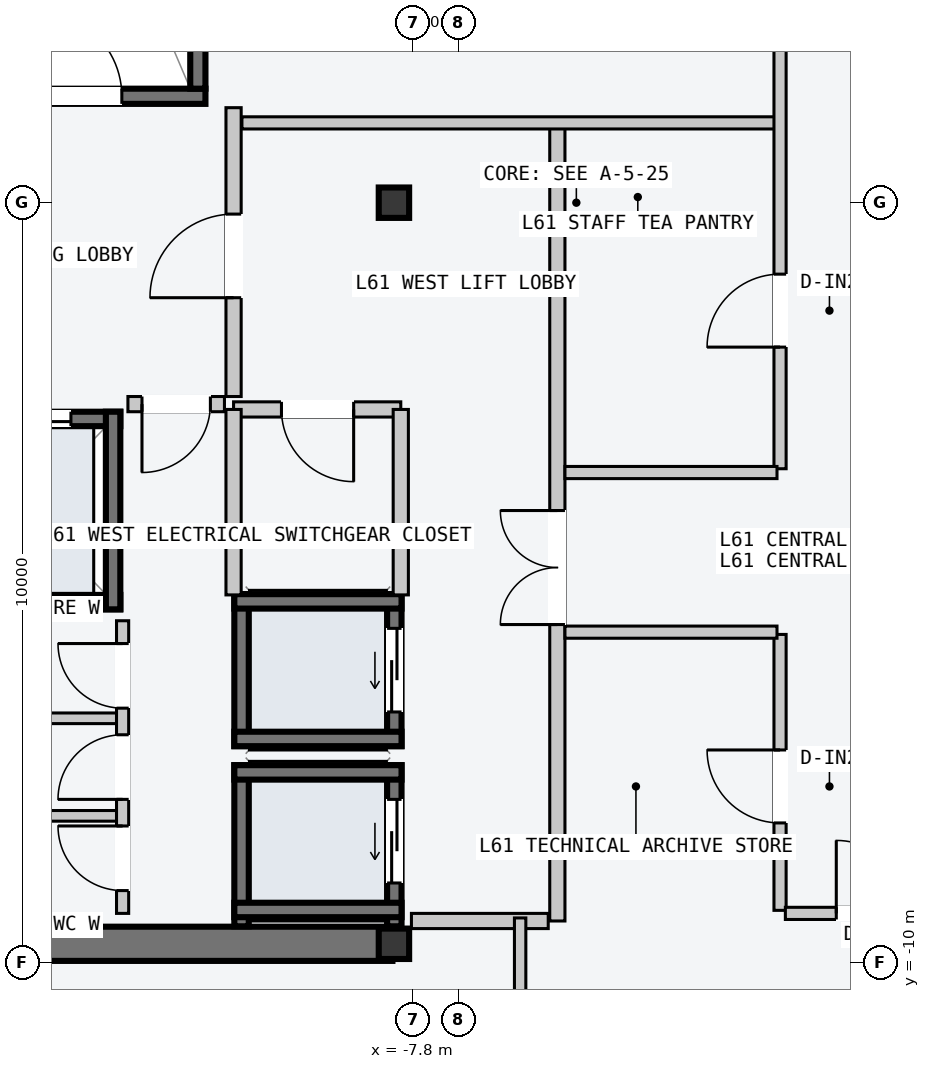
"""IFC4 building model, lengths in metres.
Left out: names, types, materials, properties, quantities, classifications, styles, units other than length and angle.
Written with IfcOpenShell. Run it as: python <this file> out.ifc"""

import sys

from ifc_helpers import new_model, si_unit, direction, frame, frame_2d, origin, origin_2d, place, context, subcontext, project, spatial, rectangle, i_section, extrude, element, fill, save


model = new_model("IFC4")
c1 = context("Model", 3, precision=1e-05, world=origin(), true_north=direction((0.0, 1.0)))
c2 = subcontext(c1, "Body", "Model", "MODEL_VIEW")
j1 = project(units=[si_unit("LENGTHUNIT", "METRE"), si_unit("PLANEANGLEUNIT", "RADIAN")], contexts=[c1])
p1 = place(None, origin())
s1 = spatial("IfcSite", under=j1, at=p1, CompositionType="ELEMENT")
p2 = place(p1, origin())
s2 = spatial("IfcBuilding", under=s1, at=p2, CompositionType="ELEMENT")
p3 = place(p2, frame((0.0, 0.0, 232.8)))
s3 = spatial("IfcBuildingStorey", under=s2, at=p3, CompositionType="ELEMENT", Elevation=232.8)
p4 = place(p3, frame((-14.53, -9.75, -0.2), z_axis=(0.0, 0.0, 1.0), x_axis=(1.0, 0.0, 0.0)))
e1 = element("IfcWall", 1, at=p4, inside=s3, PredefinedType="SHEAR", context=c2, shape_type="SweptSolid", body=[
    extrude(rectangle(XDim=6.46, YDim=0.45, at=frame_2d((3.23, 0.0))), origin(), (0.0, 0.0, 1.0), 3.6),
])
p5 = place(p3, frame((-14.25, 1.4, -0.2), z_axis=(0.0, 0.0, 1.0), x_axis=(1.0, 0.0, 0.0)))
e2 = element("IfcWall", 2, at=p5, inside=s3, PredefinedType="SOLIDWALL", context=c2, shape_type="SweptSolid", body=[
    extrude(rectangle(XDim=3.72, YDim=0.2, at=frame_2d((1.86, 0.0))), origin(), (0.0, 0.0, 1.0), 3.6),
])
p6 = place(p5, frame((1.5, 0.0, 0.2)))
e3 = element("IfcOpeningElement", 3, at=p6, cuts=e2, PredefinedType="OPENING", context=c2, shape_type="SweptSolid", body=[
    extrude(rectangle(XDim=1.12, YDim=2.18, at=frame_2d((0.56, 1.09))), frame((0.0, 0.11, 0.0), z_axis=(0.0, -1.0, 0.0), x_axis=(1.0, 0.0, 0.0)), (0.0, 0.0, 1.0), 0.22),
])
p7 = place(p3, frame((-10.63, 1.5, -0.2), z_axis=(0.0, 0.0, 1.0), x_axis=(0.0, 1.0, 0.0)))
e4 = element("IfcWall", 4, at=p7, inside=s3, PredefinedType="SOLIDWALL", context=c2, shape_type="SweptSolid", body=[
    extrude(rectangle(XDim=7.8, YDim=0.2, at=frame_2d((3.9, 0.0))), origin(), (0.0, 0.0, 1.0), 3.6),
])
for number, where, z_axis, x_axis in (
    (5, (-8.05, -9.75, 0.0), (0.0, 0.0, 1.0), (1.0, 0.0, 0.0)),
    (6, (-8.05, 0.0, 0.0), (0.0, 0.0, 1.0), (1.0, 0.0, 0.0)),
):
    element("IfcColumn", number, at=place(p3, frame(where, z_axis=z_axis, x_axis=x_axis)), inside=s3, PredefinedType="COLUMN", context=c2, shape_type="SweptSolid", body=[
        extrude(i_section(OverallWidth=0.4, OverallDepth=0.4, WebThickness=0.013, FlangeThickness=0.021, at=origin_2d()), origin(), (0.0, 0.0, 1.0), 3.6),
    ])
p8 = place(p3, frame((-8.045, -9.52, -0.2), z_axis=(0.0, 0.0, 1.0), x_axis=(0.0, 1.0, 0.0)))
e7 = element("IfcWall", 7, at=p8, inside=s3, PredefinedType="SOLIDWALL", context=c2, shape_type="SweptSolid", body=[
    extrude(rectangle(XDim=2.12, YDim=0.19, at=frame_2d((1.06, 0.0))), origin(), (0.0, 0.0, 1.0), 3.6),
])
p9 = place(p8, frame((0.57, 0.0, 0.2)))
e8 = element("IfcOpeningElement", 8, at=p9, cuts=e7, PredefinedType="OPENING", context=c2, shape_type="SweptSolid", body=[
    extrude(rectangle(XDim=1.1, YDim=2.2, at=frame_2d((0.55, 1.1))), frame((0.0, 0.105, 0.0), z_axis=(0.0, -1.0, 0.0), x_axis=(1.0, 0.0, 0.0)), (0.0, 0.0, 1.0), 0.21),
])
p10 = place(p3, frame((-10.055, -9.52, -0.2), z_axis=(0.0, 0.0, 1.0), x_axis=(0.0, 1.0, 0.0)))
e9 = element("IfcWall", 9, at=p10, inside=s3, PredefinedType="SOLIDWALL", context=c2, shape_type="SweptSolid", body=[
    extrude(rectangle(XDim=2.12, YDim=0.19, at=frame_2d((1.06, 0.0))), origin(), (0.0, 0.0, 1.0), 3.6),
])
for number, where, z_axis, x_axis in (
    (10, (-10.15, -7.495, -0.2), (0.0, 0.0, 1.0), (1.0, 0.0, 0.0)),
    (11, (-10.15, -9.305, -0.2), (0.0, 0.0, 1.0), (1.0, 0.0, 0.0)),
):
    element("IfcWall", number, at=place(p3, frame(where, z_axis=z_axis, x_axis=x_axis)), inside=s3, PredefinedType="SOLIDWALL", context=c2, shape_type="SweptSolid", body=[
        extrude(rectangle(XDim=2.2, YDim=0.19, at=frame_2d((1.1, 0.0))), origin(), (0.0, 0.0, 1.0), 3.6),
    ])
p11 = place(p3, frame((-8.045, -7.15, -0.2), z_axis=(0.0, 0.0, 1.0), x_axis=(0.0, 1.0, 0.0)))
e12 = element("IfcWall", 12, at=p11, inside=s3, PredefinedType="SOLIDWALL", context=c2, shape_type="SweptSolid", body=[
    extrude(rectangle(XDim=2.0, YDim=0.19, at=frame_2d((1.0, 0.0))), origin(), (0.0, 0.0, 1.0), 3.6),
])
p12 = place(p11, frame((0.45, 0.0, 0.2)))
e13 = element("IfcOpeningElement", 13, at=p12, cuts=e12, PredefinedType="OPENING", context=c2, shape_type="SweptSolid", body=[
    extrude(rectangle(XDim=1.1, YDim=2.2, at=frame_2d((0.55, 1.1))), frame((0.0, 0.105, 0.0), z_axis=(0.0, -1.0, 0.0), x_axis=(1.0, 0.0, 0.0)), (0.0, 0.0, 1.0), 0.21),
])
p13 = place(p3, frame((-10.055, -7.15, -0.2), z_axis=(0.0, 0.0, 1.0), x_axis=(0.0, 1.0, 0.0)))
e14 = element("IfcWall", 14, at=p13, inside=s3, PredefinedType="SOLIDWALL", context=c2, shape_type="SweptSolid", body=[
    extrude(rectangle(XDim=2.0, YDim=0.19, at=frame_2d((1.0, 0.0))), origin(), (0.0, 0.0, 1.0), 3.6),
])
for number, where, z_axis, x_axis in (
    (15, (-10.15, -5.245, -0.2), (0.0, 0.0, 1.0), (1.0, 0.0, 0.0)),
    (16, (-10.15, -7.055, -0.2), (0.0, 0.0, 1.0), (1.0, 0.0, 0.0)),
):
    element("IfcWall", number, at=place(p3, frame(where, z_axis=z_axis, x_axis=x_axis)), inside=s3, PredefinedType="SOLIDWALL", context=c2, shape_type="SweptSolid", body=[
        extrude(rectangle(XDim=2.2, YDim=0.19, at=frame_2d((1.1, 0.0))), origin(), (0.0, 0.0, 1.0), 3.6),
    ])
p14 = place(p3, frame((-14.33, -2.845, -0.2), z_axis=(0.0, 0.0, 1.0), x_axis=(1.0, 0.0, 0.0)))
e17 = element("IfcWall", 17, at=p14, inside=s3, PredefinedType="SOLIDWALL", context=c2, shape_type="SweptSolid", body=[
    extrude(rectangle(XDim=2.68, YDim=0.19, at=frame_2d((1.34, 0.0))), origin(), (0.0, 0.0, 1.0), 3.6),
])
p15 = place(p14, frame((0.83, 0.0, 0.2)))
e18 = element("IfcOpeningElement", 18, at=p15, cuts=e17, PredefinedType="OPENING", context=c2, shape_type="SweptSolid", body=[
    extrude(rectangle(XDim=1.2, YDim=2.2, at=frame_2d((0.6, 1.1))), frame((0.0, 0.105, 0.0), z_axis=(0.0, -1.0, 0.0), x_axis=(1.0, 0.0, 0.0)), (0.0, 0.0, 1.0), 0.21),
])
p16 = place(p3, frame((-14.33, -5.255, -0.2), z_axis=(0.0, 0.0, 1.0), x_axis=(1.0, 0.0, 0.0)))
e19 = element("IfcWall", 19, at=p16, inside=s3, PredefinedType="SOLIDWALL", context=c2, shape_type="SweptSolid", body=[
    extrude(rectangle(XDim=2.68, YDim=0.19, at=frame_2d((1.34, 0.0))), origin(), (0.0, 0.0, 1.0), 3.6),
])
p17 = place(p3, frame((-11.745, -5.35, -0.2), z_axis=(0.0, 0.0, 1.0), x_axis=(0.0, 1.0, 0.0)))
e20 = element("IfcWall", 20, at=p17, inside=s3, PredefinedType="SOLIDWALL", context=c2, shape_type="SweptSolid", body=[
    extrude(rectangle(XDim=2.6, YDim=0.19, at=frame_2d((1.3, 0.0))), origin(), (0.0, 0.0, 1.0), 3.6),
])
p18 = place(p3, frame((-5.9, -9.45, 0.0), z_axis=(0.0, 0.0, 1.0), x_axis=(0.0, 1.0, 0.0)))
e21 = element("IfcWall", 21, at=p18, inside=s3, PredefinedType="PARTITIONING", context=c2, shape_type="SweptSolid", body=[
    extrude(rectangle(XDim=10.5, YDim=0.2, at=frame_2d((5.25, 0.0))), origin(), (0.0, 0.0, 1.0), 3.4),
])
p19 = place(p18, frame((3.9, 0.0, 0.0)))
e22 = element("IfcOpeningElement", 22, at=p19, cuts=e21, PredefinedType="OPENING", context=c2, shape_type="SweptSolid", body=[
    extrude(rectangle(XDim=1.5, YDim=2.2, at=frame_2d((0.75, 1.1))), frame((0.0, 0.11, 0.0), z_axis=(0.0, -1.0, 0.0), x_axis=(1.0, 0.0, 0.0)), (0.0, 0.0, 1.0), 0.22),
])
p20 = place(p3, frame((-6.02, -9.45, 0.0), z_axis=(0.0, 0.0, 1.0), x_axis=(-1.0, 0.0, 0.0)))
e23 = element("IfcWall", 23, at=p20, inside=s3, PredefinedType="PARTITIONING", context=c2, shape_type="SweptSolid", body=[
    extrude(rectangle(XDim=1.8, YDim=0.2, at=frame_2d((0.9, 0.0))), origin(), (0.0, 0.0, 1.0), 3.4),
])
p21 = place(p3, frame((-10.16, -2.55, 0.0), z_axis=(0.0, 0.0, 1.0), x_axis=(0.0, 1.0, 0.0)))
e24 = element("IfcWall", 24, at=p21, inside=s3, PredefinedType="PARTITIONING", context=c2, shape_type="SweptSolid", body=[
    extrude(rectangle(XDim=3.8, YDim=0.2, at=frame_2d((1.9, 0.0))), origin(), (0.0, 0.0, 1.0), 3.4),
])
p22 = place(p21, frame((1.3, 0.0, 0.0)))
e25 = element("IfcOpeningElement", 25, at=p22, cuts=e24, PredefinedType="OPENING", context=c2, shape_type="SweptSolid", body=[
    extrude(rectangle(XDim=1.1, YDim=2.15, at=frame_2d((0.55, 1.075))), frame((0.0, 0.11, 0.0), z_axis=(0.0, -1.0, 0.0), x_axis=(1.0, 0.0, 0.0)), (0.0, 0.0, 1.0), 0.22),
])
p23 = place(p3, frame((-10.28, -2.65, 0.0), z_axis=(0.0, 0.0, 1.0), x_axis=(-1.0, 0.0, 0.0)))
e26 = element("IfcWall", 26, at=p23, inside=s3, PredefinedType="PARTITIONING", context=c2, shape_type="SweptSolid", body=[
    extrude(rectangle(XDim=1.27, YDim=0.2, at=frame_2d((0.635, 0.0))), origin(), (0.0, 0.0, 1.0), 3.4),
])
p24 = place(p23, frame((0.185, 0.0, 0.0)))
e27 = element("IfcOpeningElement", 27, at=p24, cuts=e26, PredefinedType="OPENING", context=c2, shape_type="SweptSolid", body=[
    extrude(rectangle(XDim=0.9, YDim=2.15, at=frame_2d((0.45, 1.075))), frame((0.0, 0.11, 0.0), z_axis=(0.0, -1.0, 0.0), x_axis=(1.0, 0.0, 0.0)), (0.0, 0.0, 1.0), 0.22),
])
p25 = place(p3, frame((-7.96, -2.72, 0.0), z_axis=(0.0, 0.0, 1.0), x_axis=(-1.0, 0.0, 0.0)))
e28 = element("IfcWall", 28, at=p25, inside=s3, PredefinedType="PARTITIONING", context=c2, shape_type="SweptSolid", body=[
    extrude(rectangle(XDim=2.2, YDim=0.2, at=frame_2d((1.1, 0.0))), origin(), (0.0, 0.0, 1.0), 3.4),
])
p26 = place(p25, frame((0.62, 0.0, 0.0)))
e29 = element("IfcOpeningElement", 29, at=p26, cuts=e28, PredefinedType="OPENING", context=c2, shape_type="SweptSolid", body=[
    extrude(rectangle(XDim=0.95, YDim=2.1, at=frame_2d((0.475, 1.05))), frame((0.0, 0.11, 0.0), z_axis=(0.0, -1.0, 0.0), x_axis=(1.0, 0.0, 0.0)), (0.0, 0.0, 1.0), 0.22),
])
for number, where, z_axis, x_axis in (
    (30, (-7.96, -5.16, 0.0), (0.0, 0.0, 1.0), (0.0, 1.0, 0.0)),
    (31, (-10.16, -5.16, 0.0), (0.0, 0.0, 1.0), (0.0, 1.0, 0.0)),
):
    element("IfcWall", number, at=place(p3, frame(where, z_axis=z_axis, x_axis=x_axis)), inside=s3, PredefinedType="PARTITIONING", context=c2, shape_type="SweptSolid", body=[
        extrude(rectangle(XDim=2.44, YDim=0.2, at=frame_2d((1.22, 0.0))), origin(), (0.0, 0.0, 1.0), 3.4),
    ])
for number, where, z_axis, x_axis in (
    (32, (-11.7, -8.067, 0.0), (0.0, 0.0, 1.0), (-1.0, 0.0, 0.0)),
    (33, (-11.7, -6.783, 0.0), (0.0, 0.0, 1.0), (-1.0, 0.0, 0.0)),
):
    element("IfcWall", number, at=place(p3, frame(where, z_axis=z_axis, x_axis=x_axis)), inside=s3, PredefinedType="PARTITIONING", context=c2, shape_type="SweptSolid", body=[
        extrude(rectangle(XDim=2.5, YDim=0.14, at=frame_2d((1.25, 0.0))), origin(), (0.0, 0.0, 1.0), 3.4),
    ])
p27 = place(p3, frame((-11.62, -9.35, 0.0), z_axis=(0.0, 0.0, 1.0), x_axis=(0.0, 1.0, 0.0)))
e34 = element("IfcWall", 34, at=p27, inside=s3, PredefinedType="PARTITIONING", context=c2, shape_type="SweptSolid", body=[
    extrude(rectangle(XDim=3.85, YDim=0.16, at=frame_2d((1.925, 0.0))), origin(), (0.0, 0.0, 1.0), 3.4),
])
p28 = place(p27, frame((0.3, 0.0, 0.0)))
e35 = element("IfcOpeningElement", 35, at=p28, cuts=e34, PredefinedType="OPENING", context=c2, shape_type="SweptSolid", body=[
    extrude(rectangle(XDim=0.85, YDim=2.12, at=frame_2d((0.425, 1.06))), frame((0.0, 0.09, 0.0), z_axis=(0.0, -1.0, 0.0), x_axis=(1.0, 0.0, 0.0)), (0.0, 0.0, 1.0), 0.18),
])
p29 = place(p27, frame((1.5, 0.0, 0.0)))
e36 = element("IfcOpeningElement", 36, at=p29, cuts=e34, PredefinedType="OPENING", context=c2, shape_type="SweptSolid", body=[
    extrude(rectangle(XDim=0.85, YDim=2.12, at=frame_2d((0.425, 1.06))), frame((0.0, 0.09, 0.0), z_axis=(0.0, -1.0, 0.0), x_axis=(1.0, 0.0, 0.0)), (0.0, 0.0, 1.0), 0.18),
])
p30 = place(p27, frame((2.7, 0.0, 0.0)))
e37 = element("IfcOpeningElement", 37, at=p30, cuts=e34, PredefinedType="OPENING", context=c2, shape_type="SweptSolid", body=[
    extrude(rectangle(XDim=0.85, YDim=2.12, at=frame_2d((0.425, 1.06))), frame((0.0, 0.09, 0.0), z_axis=(0.0, -1.0, 0.0), x_axis=(1.0, 0.0, 0.0)), (0.0, 0.0, 1.0), 0.18),
])
p31 = place(p3, frame((-10.05, 1.05, 0.0), z_axis=(0.0, 0.0, 1.0), x_axis=(1.0, 0.0, 0.0)))
e38 = element("IfcWall", 38, at=p31, inside=s3, PredefinedType="PARTITIONING", context=c2, shape_type="SweptSolid", body=[
    extrude(rectangle(XDim=7.04, YDim=0.16, at=frame_2d((3.52, 0.0))), origin(), (0.0, 0.0, 1.0), 3.4),
])
p32 = place(p3, frame((-2.97, -3.5, 0.0), z_axis=(0.0, 0.0, 1.0), x_axis=(0.0, 1.0, 0.0)))
e39 = element("IfcWall", 39, at=p32, inside=s3, PredefinedType="PARTITIONING", context=c2, shape_type="SweptSolid", body=[
    extrude(rectangle(XDim=13.67, YDim=0.16, at=frame_2d((6.835, 0.0))), origin(), (0.0, 0.0, 1.0), 3.4),
])
p33 = place(p32, frame((6.1, 0.0, 0.0)))
e40 = element("IfcOpeningElement", 40, at=p33, cuts=e39, PredefinedType="OPENING", context=c2, shape_type="SweptSolid", body=[
    extrude(rectangle(XDim=1.24, YDim=2.24, at=frame_2d((0.62, 1.12))), frame((0.0, 0.09, 0.0), z_axis=(0.0, -1.0, 0.0), x_axis=(1.0, 0.0, 0.0)), (0.0, 0.0, 1.0), 0.18),
])
p34 = place(p32, frame((1.6, 0.0, 0.0)))
e41 = element("IfcOpeningElement", 41, at=p34, cuts=e39, PredefinedType="OPENING", context=c2, shape_type="SweptSolid", body=[
    extrude(rectangle(XDim=0.96, YDim=2.18, at=frame_2d((0.48, 1.09))), frame((0.0, 0.09, 0.0), z_axis=(0.0, -1.0, 0.0), x_axis=(1.0, 0.0, 0.0)), (0.0, 0.0, 1.0), 0.18),
])
p35 = place(p3, frame((-5.8, -3.55, 0.0), z_axis=(0.0, 0.0, 1.0), x_axis=(1.0, 0.0, 0.0)))
e42 = element("IfcWall", 42, at=p35, inside=s3, PredefinedType="PARTITIONING", context=c2, shape_type="SweptSolid", body=[
    extrude(rectangle(XDim=2.79, YDim=0.16, at=frame_2d((1.395, 0.0))), origin(), (0.0, 0.0, 1.0), 3.4),
])
p36 = place(p3, frame((-2.97, -9.31, 0.0), z_axis=(0.0, 0.0, 1.0), x_axis=(0.0, 1.0, 0.0)))
e43 = element("IfcWall", 43, at=p36, inside=s3, PredefinedType="PARTITIONING", context=c2, shape_type="SweptSolid", body=[
    extrude(rectangle(XDim=3.63, YDim=0.16, at=frame_2d((1.815, 0.0))), origin(), (0.0, 0.0, 1.0), 3.4),
])
p37 = place(p36, frame((1.15, 0.0, 0.0)))
e44 = element("IfcOpeningElement", 44, at=p37, cuts=e43, PredefinedType="OPENING", context=c2, shape_type="SweptSolid", body=[
    extrude(rectangle(XDim=0.96, YDim=2.18, at=frame_2d((0.48, 1.09))), frame((0.0, 0.09, 0.0), z_axis=(0.0, -1.0, 0.0), x_axis=(1.0, 0.0, 0.0)), (0.0, 0.0, 1.0), 0.18),
])
p38 = place(p3, frame((-5.8, -5.65, 0.0), z_axis=(0.0, 0.0, 1.0), x_axis=(1.0, 0.0, 0.0)))
e45 = element("IfcWall", 45, at=p38, inside=s3, PredefinedType="PARTITIONING", context=c2, shape_type="SweptSolid", body=[
    extrude(rectangle(XDim=2.79, YDim=0.16, at=frame_2d((1.395, 0.0))), origin(), (0.0, 0.0, 1.0), 3.4),
])
p39 = place(p3, frame((-6.39, -17.56, 0.0), z_axis=(0.0, 0.0, 1.0), x_axis=(0.0, 1.0, 0.0)))
e46 = element("IfcWall", 46, at=p39, inside=s3, PredefinedType="PARTITIONING", context=c2, shape_type="SweptSolid", body=[
    extrude(rectangle(XDim=8.15, YDim=0.15, at=frame_2d((4.075, 0.0))), origin(), (0.0, 0.0, 1.0), 3.4),
])
p40 = place(p39, frame((1.05, 0.0, 0.0)))
e47 = element("IfcOpeningElement", 47, at=p40, cuts=e46, PredefinedType="OPENING", context=c2, shape_type="SweptSolid", body=[
    extrude(rectangle(XDim=0.96, YDim=2.18, at=frame_2d((0.48, 1.09))), frame((0.0, 0.085, 0.0), z_axis=(0.0, -1.0, 0.0), x_axis=(1.0, 0.0, 0.0)), (0.0, 0.0, 1.0), 0.17),
])
p41 = place(p3, frame((-2.9, -9.35, 0.0), z_axis=(0.0, 0.0, 1.0), x_axis=(1.0, 0.0, 0.0)))
e48 = element("IfcWall", 48, at=p41, inside=s3, PredefinedType="PARTITIONING", context=c2, shape_type="SweptSolid", body=[
    extrude(rectangle(XDim=2.3, YDim=0.16, at=frame_2d((1.15, 0.0))), origin(), (0.0, 0.0, 1.0), 3.4),
])
p42 = place(p41, frame((0.67, 0.0, 0.0)))
e49 = element("IfcOpeningElement", 49, at=p42, cuts=e48, PredefinedType="OPENING", context=c2, shape_type="SweptSolid", body=[
    extrude(rectangle(XDim=0.96, YDim=2.18, at=frame_2d((0.48, 1.09))), frame((0.0, 0.09, 0.0), z_axis=(0.0, -1.0, 0.0), x_axis=(1.0, 0.0, 0.0)), (0.0, 0.0, 1.0), 0.18),
])
p43 = place(p6, origin())
e50 = element("IfcDoor", 50, at=p43, inside=s3, OperationType="SINGLE_SWING_LEFT", PredefinedType="DOOR", context=c2, shape_type="SweptSolid", body=[
    extrude(rectangle(XDim=1.12, YDim=2.18, at=frame_2d((0.56, 1.09))), frame((0.0, 0.025, 0.0), z_axis=(0.0, -1.0, 0.0), x_axis=(1.0, 0.0, 0.0)), (0.0, 0.0, 1.0), 0.05),
])
fill(e3, e50)
p44 = place(p9, origin())
e51 = element("IfcDoor", 51, at=p44, inside=s3, OperationType="SLIDING_TO_LEFT", PredefinedType="DOOR", context=c2, shape_type="SweptSolid", body=[
    extrude(rectangle(XDim=1.1, YDim=2.2, at=frame_2d((0.55, 1.1))), frame((0.0, 0.025, 0.0), z_axis=(0.0, -1.0, 0.0), x_axis=(1.0, 0.0, 0.0)), (0.0, 0.0, 1.0), 0.05),
])
fill(e8, e51)
p45 = place(p12, origin())
e52 = element("IfcDoor", 52, at=p45, inside=s3, OperationType="SLIDING_TO_LEFT", PredefinedType="DOOR", context=c2, shape_type="SweptSolid", body=[
    extrude(rectangle(XDim=1.1, YDim=2.2, at=frame_2d((0.55, 1.1))), frame((0.0, 0.025, 0.0), z_axis=(0.0, -1.0, 0.0), x_axis=(1.0, 0.0, 0.0)), (0.0, 0.0, 1.0), 0.05),
])
fill(e13, e52)
p46 = place(p15, origin())
e53 = element("IfcDoor", 53, at=p46, inside=s3, OperationType="SLIDING_TO_LEFT", PredefinedType="DOOR", context=c2, shape_type="SweptSolid", body=[
    extrude(rectangle(XDim=1.2, YDim=2.2, at=frame_2d((0.6, 1.1))), frame((0.0, 0.025, 0.0), z_axis=(0.0, -1.0, 0.0), x_axis=(1.0, 0.0, 0.0)), (0.0, 0.0, 1.0), 0.05),
])
fill(e18, e53)
p47 = place(p19, origin())
e54 = element("IfcDoor", 54, at=p47, inside=s3, OperationType="DOUBLE_DOOR_SINGLE_SWING", PredefinedType="DOOR", context=c2, shape_type="SweptSolid", body=[
    extrude(rectangle(XDim=1.5, YDim=2.2, at=frame_2d((0.75, 1.1))), frame((0.0, 0.025, 0.0), z_axis=(0.0, -1.0, 0.0), x_axis=(1.0, 0.0, 0.0)), (0.0, 0.0, 1.0), 0.05),
])
fill(e22, e54)
p48 = place(p22, origin())
e55 = element("IfcDoor", 55, at=p48, inside=s3, OperationType="SINGLE_SWING_LEFT", PredefinedType="DOOR", context=c2, shape_type="SweptSolid", body=[
    extrude(rectangle(XDim=1.1, YDim=2.15, at=frame_2d((0.55, 1.075))), frame((0.0, 0.025, 0.0), z_axis=(0.0, -1.0, 0.0), x_axis=(1.0, 0.0, 0.0)), (0.0, 0.0, 1.0), 0.05),
])
fill(e25, e55)
p49 = place(p24, origin())
e56 = element("IfcDoor", 56, at=p49, inside=s3, OperationType="SINGLE_SWING_RIGHT", PredefinedType="DOOR", context=c2, shape_type="SweptSolid", body=[
    extrude(rectangle(XDim=0.9, YDim=2.15, at=frame_2d((0.45, 1.075))), frame((0.0, 0.025, 0.0), z_axis=(0.0, -1.0, 0.0), x_axis=(1.0, 0.0, 0.0)), (0.0, 0.0, 1.0), 0.05),
])
fill(e27, e56)
p50 = place(p26, origin())
e57 = element("IfcDoor", 57, at=p50, inside=s3, OperationType="SINGLE_SWING_LEFT", PredefinedType="DOOR", context=c2, shape_type="SweptSolid", body=[
    extrude(rectangle(XDim=0.95, YDim=2.1, at=frame_2d((0.475, 1.05))), frame((0.0, 0.025, 0.0), z_axis=(0.0, -1.0, 0.0), x_axis=(1.0, 0.0, 0.0)), (0.0, 0.0, 1.0), 0.05),
])
fill(e29, e57)
p51 = place(p28, origin())
e58 = element("IfcDoor", 58, at=p51, inside=s3, OperationType="SINGLE_SWING_RIGHT", PredefinedType="DOOR", context=c2, shape_type="SweptSolid", body=[
    extrude(rectangle(XDim=0.85, YDim=2.12, at=frame_2d((0.425, 1.06))), frame((0.0, 0.025, 0.0), z_axis=(0.0, -1.0, 0.0), x_axis=(1.0, 0.0, 0.0)), (0.0, 0.0, 1.0), 0.05),
])
fill(e35, e58)
p52 = place(p29, origin())
e59 = element("IfcDoor", 59, at=p52, inside=s3, OperationType="SINGLE_SWING_LEFT", PredefinedType="DOOR", context=c2, shape_type="SweptSolid", body=[
    extrude(rectangle(XDim=0.85, YDim=2.12, at=frame_2d((0.425, 1.06))), frame((0.0, 0.025, 0.0), z_axis=(0.0, -1.0, 0.0), x_axis=(1.0, 0.0, 0.0)), (0.0, 0.0, 1.0), 0.05),
])
fill(e36, e59)
p53 = place(p30, origin())
e60 = element("IfcDoor", 60, at=p53, inside=s3, OperationType="SINGLE_SWING_RIGHT", PredefinedType="DOOR", context=c2, shape_type="SweptSolid", body=[
    extrude(rectangle(XDim=0.85, YDim=2.12, at=frame_2d((0.425, 1.06))), frame((0.0, 0.025, 0.0), z_axis=(0.0, -1.0, 0.0), x_axis=(1.0, 0.0, 0.0)), (0.0, 0.0, 1.0), 0.05),
])
fill(e37, e60)
p54 = place(p34, origin())
e61 = element("IfcDoor", 61, at=p54, inside=s3, OperationType="SINGLE_SWING_LEFT", PredefinedType="DOOR", context=c2, shape_type="SweptSolid", body=[
    extrude(rectangle(XDim=0.96, YDim=2.18, at=frame_2d((0.48, 1.09))), frame((0.0, 0.025, 0.0), z_axis=(0.0, -1.0, 0.0), x_axis=(1.0, 0.0, 0.0)), (0.0, 0.0, 1.0), 0.05),
])
fill(e41, e61)
p55 = place(p37, origin())
e62 = element("IfcDoor", 62, at=p55, inside=s3, OperationType="SINGLE_SWING_RIGHT", PredefinedType="DOOR", context=c2, shape_type="SweptSolid", body=[
    extrude(rectangle(XDim=0.96, YDim=2.18, at=frame_2d((0.48, 1.09))), frame((0.0, 0.025, 0.0), z_axis=(0.0, -1.0, 0.0), x_axis=(1.0, 0.0, 0.0)), (0.0, 0.0, 1.0), 0.05),
])
fill(e44, e62)
p56 = place(p42, origin())
e63 = element("IfcDoor", 63, at=p56, inside=s3, OperationType="SINGLE_SWING_LEFT", PredefinedType="DOOR", context=c2, shape_type="SweptSolid", body=[
    extrude(rectangle(XDim=0.96, YDim=2.18, at=frame_2d((0.48, 1.09))), frame((0.0, 0.025, 0.0), z_axis=(0.0, -1.0, 0.0), x_axis=(1.0, 0.0, 0.0)), (0.0, 0.0, 1.0), 0.05),
])
fill(e49, e63)
save(model, sys.argv[1])
